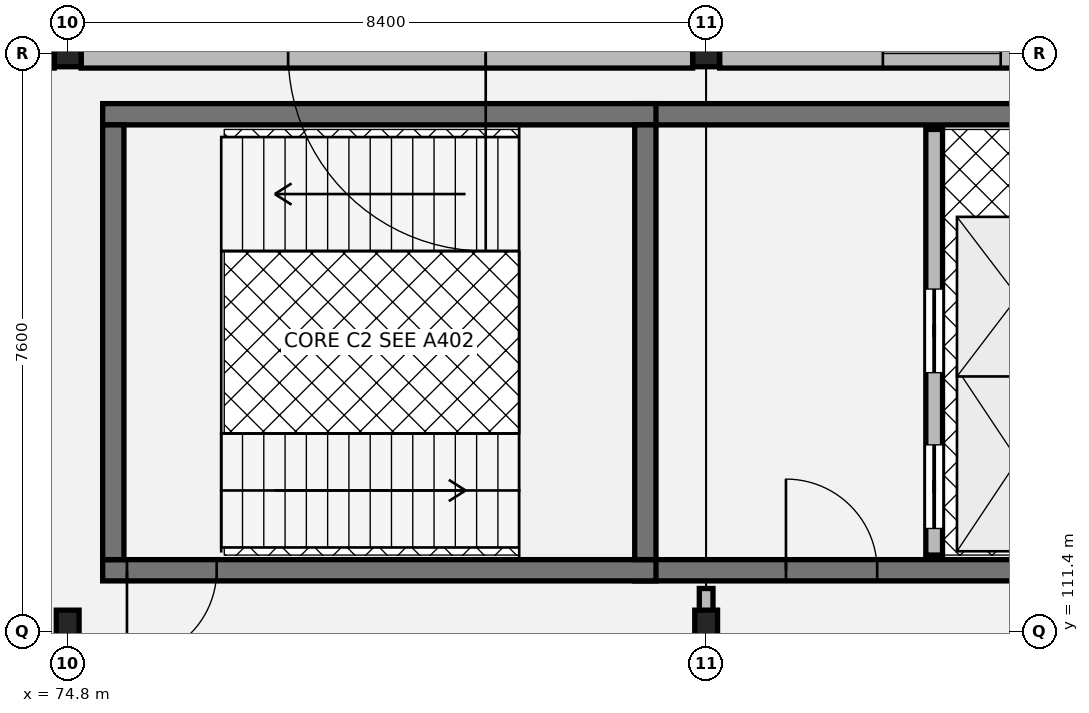
"""IFC4 building model, lengths in metres.
Left out: names, types, materials, properties, quantities, classifications, styles, units other than length and angle.
Written with IfcOpenShell. Run it as: python <this file> out.ifc"""

import sys

from ifc_helpers import new_model, si_unit, direction, frame, frame_2d, origin, origin_2d, place, context, subcontext, project, spatial, rectangle, hollow_rectangle, i_section, extrude, element, fill, save


model = new_model("IFC4")
c1 = context("Model", 3, precision=1e-05, world=origin(), true_north=direction((0.0, 1.0)))
c2 = subcontext(c1, "Body", "Model", "MODEL_VIEW")
j1 = project(units=[si_unit("LENGTHUNIT", "METRE"), si_unit("PLANEANGLEUNIT", "RADIAN")], contexts=[c1])
p1 = place(None, origin())
s1 = spatial("IfcSite", under=j1, at=p1, CompositionType="ELEMENT")
p2 = place(p1, origin())
s2 = spatial("IfcBuilding", under=s1, at=p2, CompositionType="ELEMENT")
p3 = place(p2, origin())
s3 = spatial("IfcBuildingStorey", under=s2, at=p3, CompositionType="ELEMENT", Elevation=0.0)
p4 = place(p3, frame((74.8, 111.4, 0.0), z_axis=(0.0, 0.0, 1.0), x_axis=(1.0, 0.0, 0.0)))
e1 = element("IfcColumn", 1, at=p4, inside=s3, PredefinedType="COLUMN", context=c2, shape_type="SweptSolid", body=[
    extrude(i_section(OverallWidth=0.3, OverallDepth=0.55, WebThickness=0.015, FlangeThickness=0.029, at=origin_2d()), origin(), (0.0, 0.0, 1.0), 5.075),
])
p5 = place(p3, frame((74.8, 119.0, 0.0), z_axis=(0.0, 0.0, 1.0), x_axis=(1.0, 0.0, 0.0)))
e2 = element("IfcColumn", 2, at=p5, inside=s3, PredefinedType="COLUMN", context=c2, shape_type="SweptSolid", body=[
    extrude(hollow_rectangle(XDim=0.35, YDim=0.35, WallThickness=0.014, at=origin_2d()), origin(), (0.0, 0.0, 1.0), 5.075),
])
p6 = place(p3, frame((83.2, 111.4, 0.0), z_axis=(0.0, 0.0, 1.0), x_axis=(1.0, 0.0, 0.0)))
e3 = element("IfcColumn", 3, at=p6, inside=s3, PredefinedType="COLUMN", context=c2, shape_type="SweptSolid", body=[
    extrude(i_section(OverallWidth=0.3, OverallDepth=0.55, WebThickness=0.015, FlangeThickness=0.029, at=origin_2d()), origin(), (0.0, 0.0, 1.0), 5.075),
])
p7 = place(p3, frame((83.2, 119.0, 0.0), z_axis=(0.0, 0.0, 1.0), x_axis=(1.0, 0.0, 0.0)))
e4 = element("IfcColumn", 4, at=p7, inside=s3, PredefinedType="COLUMN", context=c2, shape_type="SweptSolid", body=[
    extrude(hollow_rectangle(XDim=0.35, YDim=0.35, WallThickness=0.014, at=origin_2d()), origin(), (0.0, 0.0, 1.0), 5.075),
])
p8 = place(p3, frame((91.422, 119.0, 0.0), z_axis=(0.0, 0.0, 1.0), x_axis=(-1.0, 0.0, 0.0)))
e5 = element("IfcWall", 5, at=p8, inside=s3, PredefinedType="SOLIDWALL", context=c2, shape_type="SweptSolid", body=[
    extrude(rectangle(XDim=8.044, YDim=0.385, at=frame_2d((4.022, 0.0))), origin(), (0.0, 0.0, 1.0), 4.5),
])
p9 = place(p8, frame((2.147, 0.0, 0.8)))
e6 = element("IfcOpeningElement", 6, at=p9, cuts=e5, PredefinedType="OPENING", context=c2, shape_type="SweptSolid", body=[
    extrude(rectangle(XDim=1.55, YDim=2.22, at=frame_2d((0.775, 1.11))), frame((0.0, 0.202, 0.0), z_axis=(0.0, -1.0, 0.0), x_axis=(1.0, 0.0, 0.0)), (0.0, 0.0, 1.0), 0.405),
])
p10 = place(p8, frame((4.347, 0.0, 0.8)))
e7 = element("IfcOpeningElement", 7, at=p10, cuts=e5, PredefinedType="OPENING", context=c2, shape_type="SweptSolid", body=[
    extrude(rectangle(XDim=1.55, YDim=2.22, at=frame_2d((0.775, 1.11))), frame((0.0, 0.202, 0.0), z_axis=(0.0, -1.0, 0.0), x_axis=(1.0, 0.0, 0.0)), (0.0, 0.0, 1.0), 0.405),
])
p11 = place(p3, frame((83.022, 119.0, 0.0), z_axis=(0.0, 0.0, 1.0), x_axis=(-1.0, 0.0, 0.0)))
e8 = element("IfcWall", 8, at=p11, inside=s3, PredefinedType="SOLIDWALL", context=c2, shape_type="SweptSolid", body=[
    extrude(rectangle(XDim=8.044, YDim=0.385, at=frame_2d((4.022, 0.0))), origin(), (0.0, 0.0, 1.0), 4.5),
])
p12 = place(p11, frame((2.722, 0.0, 0.0)))
e9 = element("IfcOpeningElement", 9, at=p12, cuts=e8, PredefinedType="OPENING", context=c2, shape_type="SweptSolid", body=[
    extrude(rectangle(XDim=2.6, YDim=2.85, at=frame_2d((1.3, 1.425))), frame((0.0, 0.202, 0.0), z_axis=(0.0, -1.0, 0.0), x_axis=(1.0, 0.0, 0.0)), (0.0, 0.0, 1.0), 0.405),
])
p13 = place(p3, frame((74.622, 119.0, 0.0), z_axis=(0.0, 0.0, 1.0), x_axis=(-1.0, 0.0, 0.0)))
e10 = element("IfcWall", 10, at=p13, inside=s3, PredefinedType="SOLIDWALL", context=c2, shape_type="SweptSolid", body=[
    extrude(rectangle(XDim=8.044, YDim=0.385, at=frame_2d((4.022, 0.0))), origin(), (0.0, 0.0, 1.0), 4.5),
])
p14 = place(p13, frame((2.347, 0.0, 0.8)))
e11 = element("IfcOpeningElement", 11, at=p14, cuts=e10, PredefinedType="OPENING", context=c2, shape_type="SweptSolid", body=[
    extrude(rectangle(XDim=1.35, YDim=2.18, at=frame_2d((0.675, 1.09))), frame((0.0, 0.202, 0.0), z_axis=(0.0, -1.0, 0.0), x_axis=(1.0, 0.0, 0.0)), (0.0, 0.0, 1.0), 0.405),
])
p15 = place(p13, frame((4.347, 0.0, 0.8)))
e12 = element("IfcOpeningElement", 12, at=p15, cuts=e10, PredefinedType="OPENING", context=c2, shape_type="SweptSolid", body=[
    extrude(rectangle(XDim=1.35, YDim=2.18, at=frame_2d((0.675, 1.09))), frame((0.0, 0.202, 0.0), z_axis=(0.0, -1.0, 0.0), x_axis=(1.0, 0.0, 0.0)), (0.0, 0.0, 1.0), 0.405),
])
p16 = place(p3, frame((82.26, 112.2, 0.0), z_axis=(0.0, 0.0, 1.0), x_axis=(1.0, 0.0, 0.0)))
e13 = element("IfcWall", 13, at=p16, inside=s3, PredefinedType="SHEAR", context=c2, shape_type="SweptSolid", body=[
    extrude(rectangle(XDim=6.33, YDim=0.28, at=frame_2d((3.165, 0.0))), origin(), (0.0, 0.0, 1.0), 4.865),
])
p17 = place(p16, frame((1.99, 0.0, 0.0)))
e14 = element("IfcOpeningElement", 14, at=p17, cuts=e13, PredefinedType="OPENING", context=c2, shape_type="SweptSolid", body=[
    extrude(rectangle(XDim=1.2, YDim=2.16, at=frame_2d((0.6, 1.08))), frame((0.0, 0.15, 0.0), z_axis=(0.0, -1.0, 0.0), x_axis=(1.0, 0.0, 0.0)), (0.0, 0.0, 1.0), 0.3),
])
p18 = place(p3, frame((88.59, 118.2, 0.0), z_axis=(0.0, 0.0, 1.0), x_axis=(-1.0, 0.0, 0.0)))
e15 = element("IfcWall", 15, at=p18, inside=s3, PredefinedType="SHEAR", context=c2, shape_type="SweptSolid", body=[
    extrude(rectangle(XDim=6.33, YDim=0.28, at=frame_2d((3.165, 0.0))), origin(), (0.0, 0.0, 1.0), 4.865),
])
p19 = place(p3, frame((86.2, 112.4, 0.0), z_axis=(0.0, 0.0, 1.0), x_axis=(0.0, 1.0, 0.0)))
e16 = element("IfcWall", 16, at=p19, inside=s3, PredefinedType="SOLIDWALL", context=c2, shape_type="SweptSolid", body=[
    extrude(rectangle(XDim=5.6, YDim=0.22, at=frame_2d((2.8, 0.0))), origin(), (0.0, 0.0, 1.0), 4.865),
])
p20 = place(p19, frame((0.35, 0.0, 0.0)))
e17 = element("IfcOpeningElement", 17, at=p20, cuts=e16, PredefinedType="OPENING", context=c2, shape_type="SweptSolid", body=[
    extrude(rectangle(XDim=1.1, YDim=2.15, at=frame_2d((0.55, 1.075))), frame((0.0, 0.12, 0.0), z_axis=(0.0, -1.0, 0.0), x_axis=(1.0, 0.0, 0.0)), (0.0, 0.0, 1.0), 0.24),
])
p21 = place(p19, frame((2.4, 0.0, 0.0)))
e18 = element("IfcOpeningElement", 18, at=p21, cuts=e16, PredefinedType="OPENING", context=c2, shape_type="SweptSolid", body=[
    extrude(rectangle(XDim=1.1, YDim=2.15, at=frame_2d((0.55, 1.075))), frame((0.0, 0.12, 0.0), z_axis=(0.0, -1.0, 0.0), x_axis=(1.0, 0.0, 0.0)), (0.0, 0.0, 1.0), 0.24),
])
p22 = place(p3, frame((75.26, 112.2, 0.0), z_axis=(0.0, 0.0, 1.0), x_axis=(1.0, 0.0, 0.0)))
e19 = element("IfcWall", 19, at=p22, inside=s3, PredefinedType="SHEAR", context=c2, shape_type="SweptSolid", body=[
    extrude(rectangle(XDim=7.28, YDim=0.28, at=frame_2d((3.64, 0.0))), origin(), (0.0, 0.0, 1.0), 4.865),
])
p23 = place(p22, frame((0.32, 0.0, 0.0)))
e20 = element("IfcOpeningElement", 20, at=p23, cuts=e19, PredefinedType="OPENING", context=c2, shape_type="SweptSolid", body=[
    extrude(rectangle(XDim=1.18, YDim=2.18, at=frame_2d((0.59, 1.09))), frame((0.0, 0.15, 0.0), z_axis=(0.0, -1.0, 0.0), x_axis=(1.0, 0.0, 0.0)), (0.0, 0.0, 1.0), 0.3),
])
p24 = place(p3, frame((75.26, 118.2, 0.0), z_axis=(0.0, 0.0, 1.0), x_axis=(1.0, 0.0, 0.0)))
e21 = element("IfcWall", 21, at=p24, inside=s3, PredefinedType="SHEAR", context=c2, shape_type="SweptSolid", body=[
    extrude(rectangle(XDim=7.28, YDim=0.28, at=frame_2d((3.64, 0.0))), origin(), (0.0, 0.0, 1.0), 4.865),
])
for number, where, z_axis, x_axis in (
    (22, (75.4, 112.34, 0.0), (0.0, 0.0, 1.0), (0.0, 1.0, 0.0)),
    (23, (82.4, 112.34, 0.0), (0.0, 0.0, 1.0), (0.0, 1.0, 0.0)),
):
    element("IfcWall", number, at=place(p3, frame(where, z_axis=z_axis, x_axis=x_axis)), inside=s3, PredefinedType="SHEAR", context=c2, shape_type="SweptSolid", body=[
        extrude(rectangle(XDim=5.72, YDim=0.28, at=frame_2d((2.86, 0.0))), origin(), (0.0, 0.0, 1.0), 4.865),
    ])
p25 = place(p3, frame((83.2, 111.64, 0.0), z_axis=(0.0, 0.0, 1.0), x_axis=(0.0, 1.0, 0.0)))
e24 = element("IfcWall", 24, at=p25, inside=s3, PredefinedType="PARTITIONING", context=c2, shape_type="SweptSolid", body=[
    extrude(rectangle(XDim=0.32, YDim=0.18, at=frame_2d((0.16, 0.0))), origin(), (0.0, 0.0, 1.0), 4.2),
])
p26 = place(p10, origin())
e25 = element("IfcWindow", 25, at=p26, inside=s3, PartitioningType="SINGLE_PANEL", PredefinedType="WINDOW", context=c2, shape_type="SweptSolid", body=[
    extrude(rectangle(XDim=1.55, YDim=2.22, at=frame_2d((0.775, 1.11))), frame((0.0, 0.03, 0.0), z_axis=(0.0, -1.0, 0.0), x_axis=(1.0, 0.0, 0.0)), (0.0, 0.0, 1.0), 0.06),
])
fill(e7, e25)
p27 = place(p12, origin())
e26 = element("IfcDoor", 26, at=p27, inside=s3, OperationType="DOUBLE_DOOR_SINGLE_SWING", PredefinedType="GATE", context=c2, shape_type="SweptSolid", body=[
    extrude(rectangle(XDim=2.6, YDim=2.85, at=frame_2d((1.3, 1.425))), frame((0.0, 0.025, 0.0), z_axis=(0.0, -1.0, 0.0), x_axis=(1.0, 0.0, 0.0)), (0.0, 0.0, 1.0), 0.05),
])
fill(e9, e26)
p28 = place(p17, origin())
e27 = element("IfcDoor", 27, at=p28, inside=s3, OperationType="SINGLE_SWING_LEFT", PredefinedType="DOOR", context=c2, shape_type="SweptSolid", body=[
    extrude(rectangle(XDim=1.2, YDim=2.16, at=frame_2d((0.6, 1.08))), frame((0.0, 0.025, 0.0), z_axis=(0.0, -1.0, 0.0), x_axis=(1.0, 0.0, 0.0)), (0.0, 0.0, 1.0), 0.05),
])
fill(e14, e27)
p29 = place(p20, origin())
e28 = element("IfcDoor", 28, at=p29, inside=s3, OperationType="SLIDING_TO_LEFT", PredefinedType="DOOR", context=c2, shape_type="SweptSolid", body=[
    extrude(rectangle(XDim=1.1, YDim=2.15, at=frame_2d((0.55, 1.075))), frame((0.0, 0.025, 0.0), z_axis=(0.0, -1.0, 0.0), x_axis=(1.0, 0.0, 0.0)), (0.0, 0.0, 1.0), 0.05),
])
fill(e17, e28)
p30 = place(p21, origin())
e29 = element("IfcDoor", 29, at=p30, inside=s3, OperationType="SLIDING_TO_LEFT", PredefinedType="DOOR", context=c2, shape_type="SweptSolid", body=[
    extrude(rectangle(XDim=1.1, YDim=2.15, at=frame_2d((0.55, 1.075))), frame((0.0, 0.025, 0.0), z_axis=(0.0, -1.0, 0.0), x_axis=(1.0, 0.0, 0.0)), (0.0, 0.0, 1.0), 0.05),
])
fill(e18, e29)
p31 = place(p23, origin())
e30 = element("IfcDoor", 30, at=p31, inside=s3, OperationType="SINGLE_SWING_RIGHT", PredefinedType="DOOR", context=c2, shape_type="SweptSolid", body=[
    extrude(rectangle(XDim=1.18, YDim=2.18, at=frame_2d((0.59, 1.09))), frame((0.0, 0.025, 0.0), z_axis=(0.0, -1.0, 0.0), x_axis=(1.0, 0.0, 0.0)), (0.0, 0.0, 1.0), 0.05),
])
fill(e20, e30)
save(model, sys.argv[1])
